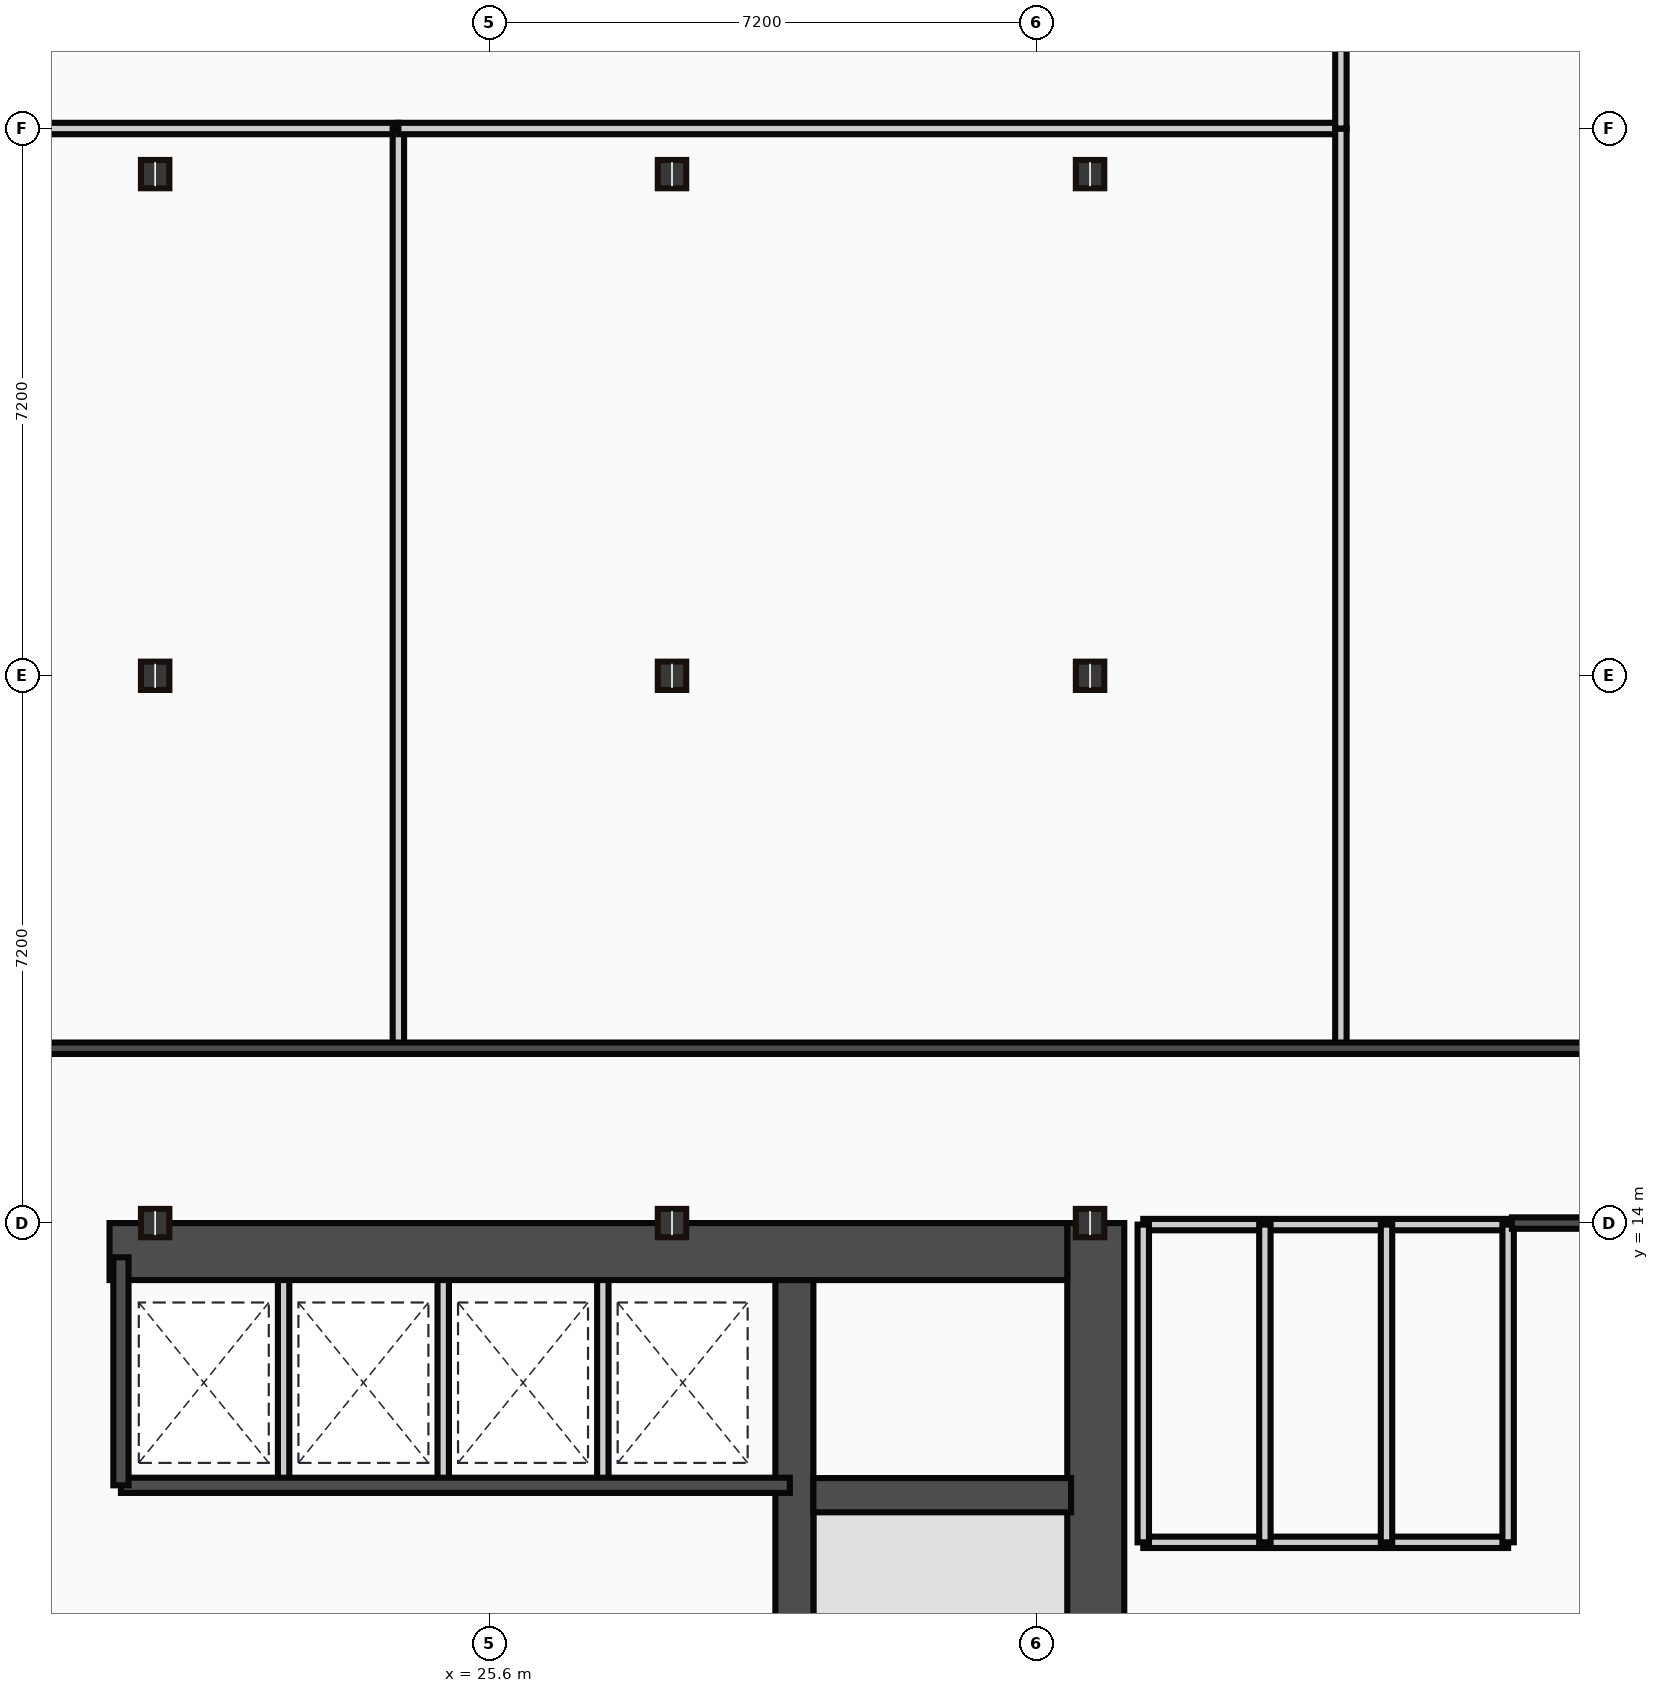
"""IFC4 building model, lengths in metres.
Left out: names, types, materials, properties, quantities, classifications, styles, units other than length and angle.
Written with IfcOpenShell. Run it as: python <this file> out.ifc"""

import sys

from ifc_helpers import new_model, si_unit, direction, frame, frame_2d, origin, origin_2d, place, context, subcontext, project, spatial, rectangle, i_section, extrude, source, transform, mapped, element, fill, save


model = new_model("IFC4")
c1 = context("Model", 3, precision=1e-05, world=origin(), true_north=direction((0.0, 1.0)))
c2 = subcontext(c1, "Body", "Model", "MODEL_VIEW")
j1 = project(units=[si_unit("LENGTHUNIT", "METRE"), si_unit("PLANEANGLEUNIT", "RADIAN")], contexts=[c1])
p1 = place(None, origin())
s1 = spatial("IfcSite", under=j1, at=p1, CompositionType="ELEMENT")
p2 = place(p1, origin())
s2 = spatial("IfcBuilding", under=s1, at=p2, CompositionType="ELEMENT")
p3 = place(p2, frame((0.0, 0.0, 184.4)))
s3 = spatial("IfcBuildingStorey", under=s2, at=p3, CompositionType="ELEMENT", Elevation=184.4)
m1 = source(origin(), c2, "Body", "SweptSolid", [
    extrude(rectangle(XDim=13.1, YDim=0.75, at=frame_2d((6.55, 0.0))), origin(), (0.0, 0.0, 1.0), 4.2),
])
p4 = place(p3, frame((33.575, 0.9, 0.0), z_axis=(0.0, 0.0, 1.0), x_axis=(0.0, 1.0, 0.0)))
e1 = element("IfcWall", 1, at=p4, inside=s3, PredefinedType="SHEAR", context=c2, shape_type="MappedRepresentation", body=[
    mapped(m1, transform((0.0, 0.0, 0.0))),
])
m2 = source(origin(), c2, "Body", "SweptSolid", [
    extrude(rectangle(XDim=12.6, YDim=0.75, at=frame_2d((6.3, 0.0))), origin(), (0.0, 0.0, 1.0), 4.2),
])
p5 = place(p3, frame((20.6, 13.625, 0.0), z_axis=(0.0, 0.0, 1.0), x_axis=(1.0, 0.0, 0.0)))
e2 = element("IfcWall", 2, at=p5, inside=s3, PredefinedType="SHEAR", context=c2, shape_type="MappedRepresentation", body=[
    mapped(m2, transform((0.0, 0.0, 0.0))),
])
p6 = place(p5, frame((9.25, 0.0, 0.0)))
e3 = element("IfcOpeningElement", 3, at=p6, cuts=e2, PredefinedType="OPENING", context=c2, shape_type="SweptSolid", body=[
    extrude(rectangle(XDim=1.1, YDim=2.15, at=frame_2d((0.55, 1.075))), frame((0.0, 0.385, 0.0), z_axis=(0.0, -1.0, 0.0), x_axis=(1.0, 0.0, 0.0)), (0.0, 0.0, 1.0), 0.77),
])
m3 = source(origin(), c2, "Body", "SweptSolid", [
    extrude(rectangle(XDim=12.35, YDim=0.5, at=frame_2d((6.175, 0.0))), origin(), (0.0, 0.0, 1.0), 4.2),
])
p7 = place(p3, frame((29.61, 0.9, 0.0), z_axis=(0.0, 0.0, 1.0), x_axis=(0.0, 1.0, 0.0)))
e4 = element("IfcWall", 4, at=p7, inside=s3, PredefinedType="SHEAR", context=c2, shape_type="MappedRepresentation", body=[
    mapped(m3, transform((0.0, 0.0, 0.0))),
])
m4 = source(origin(), c2, "Body", "SweptSolid", [
    extrude(rectangle(XDim=3.39, YDim=0.45, at=frame_2d((1.695, 0.0))), origin(), (0.0, 0.0, 1.0), 4.2),
])
p8 = place(p3, frame((29.86, 10.42, 0.0), z_axis=(0.0, 0.0, 1.0), x_axis=(1.0, 0.0, 0.0)))
e5 = element("IfcWall", 5, at=p8, inside=s3, PredefinedType="SHEAR", context=c2, shape_type="MappedRepresentation", body=[
    mapped(m4, transform((0.0, 0.0, 0.0))),
])
p9 = place(p8, frame((1.1, 0.0, 0.0)))
e6 = element("IfcOpeningElement", 6, at=p9, cuts=e5, PredefinedType="OPENING", context=c2, shape_type="SweptSolid", body=[
    extrude(rectangle(XDim=1.1, YDim=2.15, at=frame_2d((0.55, 1.075))), frame((0.0, 0.235, 0.0), z_axis=(0.0, -1.0, 0.0), x_axis=(1.0, 0.0, 0.0)), (0.0, 0.0, 1.0), 0.47),
])
m5 = source(origin(), c2, "Body", "SweptSolid", [
    extrude(i_section(OverallWidth=0.374, OverallDepth=0.372, WebThickness=0.016, FlangeThickness=0.026, at=origin_2d()), origin(), (0.0, 0.0, 1.0), 4.2),
])
for number, where, z_axis, x_axis in (
    (7, (21.2, 14.0, 0.0), (0.0, 0.0, 1.0), (1.0, 0.0, 0.0)),
    (8, (21.2, 21.2, 0.0), (0.0, 0.0, 1.0), (1.0, 0.0, 0.0)),
    (9, (21.2, 27.8, 0.0), (0.0, 0.0, 1.0), (1.0, 0.0, 0.0)),
    (10, (28.0, 14.0, 0.0), (0.0, 0.0, 1.0), (1.0, 0.0, 0.0)),
    (11, (28.0, 21.2, 0.0), (0.0, 0.0, 1.0), (1.0, 0.0, 0.0)),
    (12, (28.0, 27.8, 0.0), (0.0, 0.0, 1.0), (1.0, 0.0, 0.0)),
    (13, (33.5, 14.0, 0.0), (0.0, 0.0, 1.0), (1.0, 0.0, 0.0)),
    (14, (33.5, 21.2, 0.0), (0.0, 0.0, 1.0), (1.0, 0.0, 0.0)),
    (15, (33.5, 27.8, 0.0), (0.0, 0.0, 1.0), (1.0, 0.0, 0.0)),
):
    element("IfcColumn", number, at=place(p3, frame(where, z_axis=z_axis, x_axis=x_axis)), inside=s3, PredefinedType="COLUMN", context=c2, shape_type="MappedRepresentation", body=[
        mapped(m5, transform((0.0, 0.0, 0.0))),
    ])
m6 = source(origin(), c2, "Body", "SweptSolid", [
    extrude(rectangle(XDim=8.8, YDim=0.2, at=frame_2d((4.4, 0.0))), origin(), (0.0, 0.0, 1.0), 3.95),
])
p10 = place(p3, frame((20.75, 10.55, 0.0), z_axis=(0.0, 0.0, 1.0), x_axis=(1.0, 0.0, 0.0)))
e16 = element("IfcWall", 16, at=p10, inside=s3, PredefinedType="PARTITIONING", context=c2, shape_type="MappedRepresentation", body=[
    mapped(m6, transform((0.0, 0.0, 0.0))),
])
p11 = place(p10, frame((0.5, 0.0, 0.0)))
e17 = element("IfcOpeningElement", 17, at=p11, cuts=e16, PredefinedType="OPENING", context=c2, shape_type="SweptSolid", body=[
    extrude(rectangle(XDim=1.05, YDim=2.15, at=frame_2d((0.525, 1.075))), frame((0.0, 0.11, 0.0), z_axis=(0.0, -1.0, 0.0), x_axis=(1.0, 0.0, 0.0)), (0.0, 0.0, 1.0), 0.22),
])
p12 = place(p10, frame((2.6, 0.0, 0.0)))
e18 = element("IfcOpeningElement", 18, at=p12, cuts=e16, PredefinedType="OPENING", context=c2, shape_type="SweptSolid", body=[
    extrude(rectangle(XDim=1.05, YDim=2.15, at=frame_2d((0.525, 1.075))), frame((0.0, 0.11, 0.0), z_axis=(0.0, -1.0, 0.0), x_axis=(1.0, 0.0, 0.0)), (0.0, 0.0, 1.0), 0.22),
])
p13 = place(p10, frame((4.7, 0.0, 0.0)))
e19 = element("IfcOpeningElement", 19, at=p13, cuts=e16, PredefinedType="OPENING", context=c2, shape_type="SweptSolid", body=[
    extrude(rectangle(XDim=1.05, YDim=2.15, at=frame_2d((0.525, 1.075))), frame((0.0, 0.11, 0.0), z_axis=(0.0, -1.0, 0.0), x_axis=(1.0, 0.0, 0.0)), (0.0, 0.0, 1.0), 0.22),
])
p14 = place(p10, frame((6.8, 0.0, 0.0)))
e20 = element("IfcOpeningElement", 20, at=p14, cuts=e16, PredefinedType="OPENING", context=c2, shape_type="SweptSolid", body=[
    extrude(rectangle(XDim=1.05, YDim=2.15, at=frame_2d((0.525, 1.075))), frame((0.0, 0.11, 0.0), z_axis=(0.0, -1.0, 0.0), x_axis=(1.0, 0.0, 0.0)), (0.0, 0.0, 1.0), 0.22),
])
m7 = source(origin(), c2, "Body", "SweptSolid", [
    extrude(rectangle(XDim=3.0, YDim=0.2, at=frame_2d((1.5, 0.0))), origin(), (0.0, 0.0, 1.0), 3.95),
])
p15 = place(p3, frame((20.75, 10.55, 0.0), z_axis=(0.0, 0.0, 1.0), x_axis=(0.0, 1.0, 0.0)))
e21 = element("IfcWall", 21, at=p15, inside=s3, PredefinedType="PARTITIONING", context=c2, shape_type="MappedRepresentation", body=[
    mapped(m7, transform((0.0, 0.0, 0.0))),
])
m8 = source(origin(), c2, "Body", "SweptSolid", [
    extrude(rectangle(XDim=2.85, YDim=0.15, at=frame_2d((1.425, 0.0))), origin(), (0.0, 0.0, 1.0), 3.95),
])
for number, where, z_axis, x_axis in (
    (22, (22.89, 10.6, 0.0), (0.0, 0.0, 1.0), (0.0, 1.0, 0.0)),
    (23, (24.99, 10.6, 0.0), (0.0, 0.0, 1.0), (0.0, 1.0, 0.0)),
    (24, (27.09, 10.6, 0.0), (0.0, 0.0, 1.0), (0.0, 1.0, 0.0)),
):
    element("IfcWall", number, at=place(p3, frame(where, z_axis=z_axis, x_axis=x_axis)), inside=s3, PredefinedType="PARTITIONING", context=c2, shape_type="MappedRepresentation", body=[
        mapped(m8, transform((0.0, 0.0, 0.0))),
    ])
m9 = source(origin(), c2, "Body", "SweptSolid", [
    extrude(rectangle(XDim=4.8, YDim=0.15, at=frame_2d((2.4, 0.0))), origin(), (0.0, 0.0, 1.0), 2.895),
])
p16 = place(p3, frame((34.2, 13.98, 0.0), z_axis=(0.0, 0.0, 1.0), x_axis=(1.0, 0.0, 0.0)))
e25 = element("IfcWall", 25, at=p16, inside=s3, PredefinedType="PARTITIONING", context=c2, shape_type="MappedRepresentation", body=[
    mapped(m9, transform((0.0, 0.0, 0.0))),
])
p17 = place(p16, frame((0.35, 0.0, 0.0)))
e26 = element("IfcOpeningElement", 26, at=p17, cuts=e25, PredefinedType="OPENING", context=c2, shape_type="SweptSolid", body=[
    extrude(rectangle(XDim=0.85, YDim=2.1, at=frame_2d((0.425, 1.05))), frame((0.0, 0.085, 0.0), z_axis=(0.0, -1.0, 0.0), x_axis=(1.0, 0.0, 0.0)), (0.0, 0.0, 1.0), 0.17),
])
p18 = place(p16, frame((1.95, 0.0, 0.0)))
e27 = element("IfcOpeningElement", 27, at=p18, cuts=e25, PredefinedType="OPENING", context=c2, shape_type="SweptSolid", body=[
    extrude(rectangle(XDim=0.85, YDim=2.1, at=frame_2d((0.425, 1.05))), frame((0.0, 0.085, 0.0), z_axis=(0.0, -1.0, 0.0), x_axis=(1.0, 0.0, 0.0)), (0.0, 0.0, 1.0), 0.17),
])
p19 = place(p16, frame((3.5, 0.0, 0.0)))
e28 = element("IfcOpeningElement", 28, at=p19, cuts=e25, PredefinedType="OPENING", context=c2, shape_type="SweptSolid", body=[
    extrude(rectangle(XDim=0.9, YDim=2.1, at=frame_2d((0.45, 1.05))), frame((0.0, 0.085, 0.0), z_axis=(0.0, -1.0, 0.0), x_axis=(1.0, 0.0, 0.0)), (0.0, 0.0, 1.0), 0.17),
])
m10 = source(origin(), c2, "Body", "SweptSolid", [
    extrude(rectangle(XDim=4.8, YDim=0.15, at=frame_2d((2.4, 0.0))), origin(), (0.0, 0.0, 1.0), 3.95),
])
p20 = place(p3, frame((34.2, 9.8, 0.0), z_axis=(0.0, 0.0, 1.0), x_axis=(1.0, 0.0, 0.0)))
e29 = element("IfcWall", 29, at=p20, inside=s3, PredefinedType="PARTITIONING", context=c2, shape_type="MappedRepresentation", body=[
    mapped(m10, transform((0.0, 0.0, 0.0))),
])
m11 = source(origin(), c2, "Body", "SweptSolid", [
    extrude(rectangle(XDim=4.18, YDim=0.15, at=frame_2d((2.09, 0.0))), origin(), (0.0, 0.0, 1.0), 3.95),
])
for number, where, z_axis, x_axis in (
    (30, (39.0, 9.8, 0.0), (0.0, 0.0, 1.0), (0.0, 1.0, 0.0)),
    (31, (34.2, 9.8, 0.0), (0.0, 0.0, 1.0), (0.0, 1.0, 0.0)),
    (32, (35.8, 9.8, 0.0), (0.0, 0.0, 1.0), (0.0, 1.0, 0.0)),
    (33, (37.4, 9.8, 0.0), (0.0, 0.0, 1.0), (0.0, 1.0, 0.0)),
):
    element("IfcWall", number, at=place(p3, frame(where, z_axis=z_axis, x_axis=x_axis)), inside=s3, PredefinedType="PARTITIONING", context=c2, shape_type="MappedRepresentation", body=[
        mapped(m11, transform((0.0, 0.0, 0.0))),
    ])
m12 = source(origin(), c2, "Body", "SweptSolid", [
    extrude(rectangle(XDim=21.75, YDim=0.15, at=frame_2d((10.875, 0.0))), origin(), (0.0, 0.0, 1.0), 3.95),
])
p21 = place(p3, frame((19.05, 16.3, 0.0), z_axis=(0.0, 0.0, 1.0), x_axis=(1.0, 0.0, 0.0)))
e34 = element("IfcWall", 34, at=p21, inside=s3, PredefinedType="PARTITIONING", context=c2, shape_type="MappedRepresentation", body=[
    mapped(m12, transform((0.0, 0.0, 0.0))),
])
p22 = place(p21, frame((11.075, 0.0, 0.0)))
e35 = element("IfcOpeningElement", 35, at=p22, cuts=e34, PredefinedType="OPENING", context=c2, shape_type="SweptSolid", body=[
    extrude(rectangle(XDim=0.95, YDim=2.15, at=frame_2d((0.475, 1.075))), frame((0.0, 0.085, 0.0), z_axis=(0.0, -1.0, 0.0), x_axis=(1.0, 0.0, 0.0)), (0.0, 0.0, 1.0), 0.17),
])
p23 = place(p21, frame((19.145, 0.0, 0.0)))
e36 = element("IfcOpeningElement", 36, at=p23, cuts=e34, PredefinedType="OPENING", context=c2, shape_type="SweptSolid", body=[
    extrude(rectangle(XDim=0.95, YDim=2.15, at=frame_2d((0.475, 1.075))), frame((0.0, 0.085, 0.0), z_axis=(0.0, -1.0, 0.0), x_axis=(1.0, 0.0, 0.0)), (0.0, 0.0, 1.0), 0.17),
])
m13 = source(origin(), c2, "Body", "SweptSolid", [
    extrude(rectangle(XDim=1.75, YDim=0.15, at=frame_2d((0.875, 0.0))), origin(), (0.0, 0.0, 1.0), 2.895),
])
p24 = place(p3, frame((40.8, 14.0, 0.0), z_axis=(0.0, 0.0, 1.0), x_axis=(-1.0, 0.0, 0.0)))
e37 = element("IfcWall", 37, at=p24, inside=s3, PredefinedType="PARTITIONING", context=c2, shape_type="MappedRepresentation", body=[
    mapped(m13, transform((0.0, 0.0, 0.0))),
])
m14 = source(origin(), c2, "Body", "SweptSolid", [
    extrude(rectangle(XDim=5.35, YDim=0.15, at=frame_2d((2.675, 0.0))), origin(), (0.0, 0.0, 1.0), 3.95),
])
p25 = place(p3, frame((19.05, 28.4, 0.0), z_axis=(0.0, 0.0, 1.0), x_axis=(1.0, 0.0, 0.0)))
e38 = element("IfcWall", 38, at=p25, inside=s3, PredefinedType="PARTITIONING", context=c2, shape_type="MappedRepresentation", body=[
    mapped(m14, transform((0.0, 0.0, 0.0))),
])
m15 = source(origin(), c2, "Body", "SweptSolid", [
    extrude(rectangle(XDim=12.1, YDim=0.15, at=frame_2d((6.05, 0.0))), origin(), (0.0, 0.0, 1.0), 3.95),
])
p26 = place(p3, frame((24.4, 28.4, 0.0), z_axis=(0.0, 0.0, 1.0), x_axis=(0.0, -1.0, 0.0)))
e39 = element("IfcWall", 39, at=p26, inside=s3, PredefinedType="PARTITIONING", context=c2, shape_type="MappedRepresentation", body=[
    mapped(m15, transform((0.0, 0.0, 0.0))),
])
m16 = source(origin(), c2, "Body", "SweptSolid", [
    extrude(rectangle(XDim=12.4, YDim=0.15, at=frame_2d((6.2, 0.0))), origin(), (0.0, 0.0, 1.0), 3.95),
])
p27 = place(p3, frame((36.8, 28.4, 0.0), z_axis=(0.0, 0.0, 1.0), x_axis=(-1.0, 0.0, 0.0)))
e40 = element("IfcWall", 40, at=p27, inside=s3, PredefinedType="PARTITIONING", context=c2, shape_type="MappedRepresentation", body=[
    mapped(m16, transform((0.0, 0.0, 0.0))),
])
p28 = place(p3, frame((36.8, 28.4, 0.0), z_axis=(0.0, 0.0, 1.0), x_axis=(0.0, -1.0, 0.0)))
e41 = element("IfcWall", 41, at=p28, inside=s3, PredefinedType="PARTITIONING", context=c2, shape_type="MappedRepresentation", body=[
    mapped(m15, transform((0.0, 0.0, 0.0))),
])
m17 = source(origin(), c2, "Body", "SweptSolid", [
    extrude(rectangle(XDim=11.608, YDim=0.15, at=frame_2d((5.804, 0.0))), origin(), (0.0, 0.0, 1.0), 3.95),
])
p29 = place(p3, frame((36.8, 40.008, 0.0), z_axis=(0.0, 0.0, 1.0), x_axis=(0.0, -1.0, 0.0)))
e42 = element("IfcWall", 42, at=p29, inside=s3, PredefinedType="PARTITIONING", context=c2, shape_type="MappedRepresentation", body=[
    mapped(m17, transform((0.0, 0.0, 0.0))),
])
m18 = source(origin(), c2, "Body", "SweptSolid", [
    extrude(rectangle(XDim=1.1, YDim=2.15, at=frame_2d((0.55, 1.075))), frame((0.0, 0.025, 0.0), z_axis=(0.0, -1.0, 0.0), x_axis=(1.0, 0.0, 0.0)), (0.0, 0.0, 1.0), 0.05),
])
p30 = place(p9, frame((1.1, 0.0, 0.0), z_axis=(0.0, 0.0, 1.0), x_axis=(-1.0, 0.0, 0.0)))
e43 = element("IfcDoor", 43, at=p30, inside=s3, OperationType="SINGLE_SWING_RIGHT", PredefinedType="DOOR", context=c2, shape_type="MappedRepresentation", body=[
    mapped(m18, transform((0.0, 0.0, 0.0))),
])
fill(e6, e43)
p31 = place(p6, origin())
e44 = element("IfcDoor", 44, at=p31, inside=s3, OperationType="SINGLE_SWING_LEFT", PredefinedType="DOOR", context=c2, shape_type="MappedRepresentation", body=[
    mapped(m18, transform((0.0, 0.0, 0.0))),
])
fill(e3, e44)
m19 = source(origin(), c2, "Body", "SweptSolid", [
    extrude(rectangle(XDim=1.05, YDim=2.15, at=frame_2d((0.525, 1.075))), frame((0.0, 0.025, 0.0), z_axis=(0.0, -1.0, 0.0), x_axis=(1.0, 0.0, 0.0)), (0.0, 0.0, 1.0), 0.05),
])
p32 = place(p11, frame((1.05, 0.0, 0.0), z_axis=(0.0, 0.0, 1.0), x_axis=(-1.0, 0.0, 0.0)))
e45 = element("IfcDoor", 45, at=p32, inside=s3, OperationType="SLIDING_TO_LEFT", PredefinedType="DOOR", context=c2, shape_type="MappedRepresentation", body=[
    mapped(m19, transform((0.0, 0.0, 0.0))),
])
fill(e17, e45)
p33 = place(p12, frame((1.05, 0.0, 0.0), z_axis=(0.0, 0.0, 1.0), x_axis=(-1.0, 0.0, 0.0)))
e46 = element("IfcDoor", 46, at=p33, inside=s3, OperationType="SLIDING_TO_LEFT", PredefinedType="DOOR", context=c2, shape_type="MappedRepresentation", body=[
    mapped(m19, transform((0.0, 0.0, 0.0))),
])
fill(e18, e46)
p34 = place(p13, frame((1.05, 0.0, 0.0), z_axis=(0.0, 0.0, 1.0), x_axis=(-1.0, 0.0, 0.0)))
e47 = element("IfcDoor", 47, at=p34, inside=s3, OperationType="SLIDING_TO_LEFT", PredefinedType="DOOR", context=c2, shape_type="MappedRepresentation", body=[
    mapped(m19, transform((0.0, 0.0, 0.0))),
])
fill(e19, e47)
p35 = place(p14, frame((1.05, 0.0, 0.0), z_axis=(0.0, 0.0, 1.0), x_axis=(-1.0, 0.0, 0.0)))
e48 = element("IfcDoor", 48, at=p35, inside=s3, OperationType="SLIDING_TO_LEFT", PredefinedType="DOOR", context=c2, shape_type="MappedRepresentation", body=[
    mapped(m19, transform((0.0, 0.0, 0.0))),
])
fill(e20, e48)
m20 = source(origin(), c2, "Body", "SweptSolid", [
    extrude(rectangle(XDim=0.85, YDim=2.1, at=frame_2d((0.425, 1.05))), frame((0.0, 0.025, 0.0), z_axis=(0.0, -1.0, 0.0), x_axis=(1.0, 0.0, 0.0)), (0.0, 0.0, 1.0), 0.05),
])
p36 = place(p17, frame((0.85, 0.0, 0.0), z_axis=(0.0, 0.0, 1.0), x_axis=(-1.0, 0.0, 0.0)))
e49 = element("IfcDoor", 49, at=p36, inside=s3, OperationType="SINGLE_SWING_LEFT", PredefinedType="DOOR", context=c2, shape_type="MappedRepresentation", body=[
    mapped(m20, transform((0.0, 0.0, 0.0))),
])
fill(e26, e49)
p37 = place(p18, frame((0.85, 0.0, 0.0), z_axis=(0.0, 0.0, 1.0), x_axis=(-1.0, 0.0, 0.0)))
e50 = element("IfcDoor", 50, at=p37, inside=s3, OperationType="SINGLE_SWING_RIGHT", PredefinedType="DOOR", context=c2, shape_type="MappedRepresentation", body=[
    mapped(m20, transform((0.0, 0.0, 0.0))),
])
fill(e27, e50)
m21 = source(origin(), c2, "Body", "SweptSolid", [
    extrude(rectangle(XDim=0.9, YDim=2.1, at=frame_2d((0.45, 1.05))), frame((0.0, 0.025, 0.0), z_axis=(0.0, -1.0, 0.0), x_axis=(1.0, 0.0, 0.0)), (0.0, 0.0, 1.0), 0.05),
])
p38 = place(p19, frame((0.9, 0.0, 0.0), z_axis=(0.0, 0.0, 1.0), x_axis=(-1.0, 0.0, 0.0)))
e51 = element("IfcDoor", 51, at=p38, inside=s3, OperationType="SINGLE_SWING_LEFT", PredefinedType="DOOR", context=c2, shape_type="MappedRepresentation", body=[
    mapped(m21, transform((0.0, 0.0, 0.0))),
])
fill(e28, e51)
m22 = source(origin(), c2, "Body", "SweptSolid", [
    extrude(rectangle(XDim=0.95, YDim=2.15, at=frame_2d((0.475, 1.075))), frame((0.0, 0.025, 0.0), z_axis=(0.0, -1.0, 0.0), x_axis=(1.0, 0.0, 0.0)), (0.0, 0.0, 1.0), 0.05),
])
p39 = place(p22, origin())
e52 = element("IfcDoor", 52, at=p39, inside=s3, OperationType="SINGLE_SWING_RIGHT", PredefinedType="DOOR", context=c2, shape_type="MappedRepresentation", body=[
    mapped(m22, transform((0.0, 0.0, 0.0))),
])
fill(e35, e52)
p40 = place(p23, origin())
e53 = element("IfcDoor", 53, at=p40, inside=s3, OperationType="SINGLE_SWING_LEFT", PredefinedType="DOOR", context=c2, shape_type="MappedRepresentation", body=[
    mapped(m22, transform((0.0, 0.0, 0.0))),
])
fill(e36, e53)
save(model, sys.argv[1])
